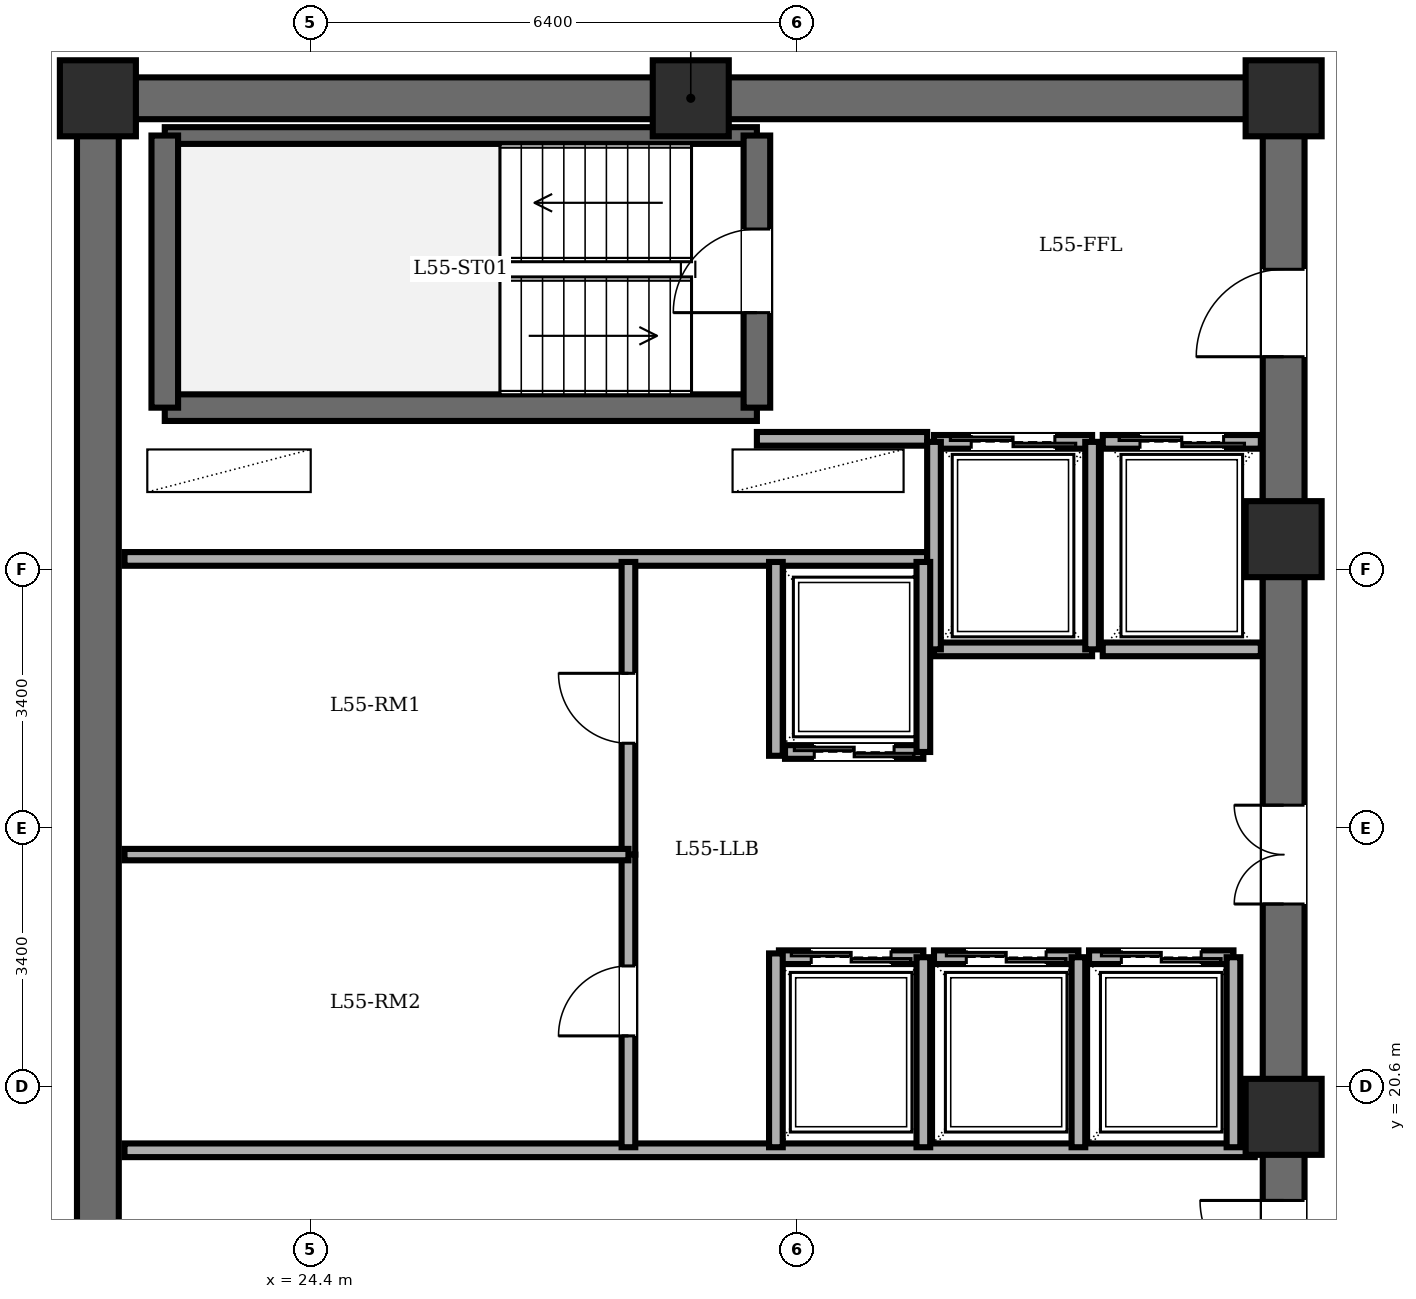
"""IFC4 building model, lengths in metres.
Left out: names, types, materials, properties, quantities, classifications, styles, units other than length and angle.
Written with IfcOpenShell. Run it as: python <this file> out.ifc"""

import sys

from ifc_helpers import new_model, si_unit, direction, frame, frame_2d, origin, origin_2d, place, context, subcontext, project, spatial, rectangle, extrude, element, fill, save


model = new_model("IFC4")
c1 = context("Model", 3, precision=1e-05, world=origin(), true_north=direction((0.0, 1.0)))
c2 = subcontext(c1, "Body", "Model", "MODEL_VIEW")
j1 = project(units=[si_unit("LENGTHUNIT", "METRE"), si_unit("PLANEANGLEUNIT", "RADIAN")], contexts=[c1])
p1 = place(None, origin())
s1 = spatial("IfcSite", under=j1, at=p1, CompositionType="ELEMENT")
p2 = place(p1, origin())
s2 = spatial("IfcBuilding", under=s1, at=p2, CompositionType="ELEMENT")
p3 = place(p2, frame((0.0, 0.0, 212.1)))
s3 = spatial("IfcBuildingStorey", under=s2, at=p3, CompositionType="ELEMENT", Elevation=212.1)
for number, where, z_axis, x_axis in (
    (1, (37.2, 20.2, 0.0), (0.0, 0.0, 1.0), (1.0, 0.0, 0.0)),
    (2, (37.2, 27.8, 0.0), (0.0, 0.0, 1.0), (1.0, 0.0, 0.0)),
    (3, (37.2, 33.6, 0.0), (0.0, 0.0, 1.0), (1.0, 0.0, 0.0)),
    (4, (29.4, 33.6, 0.0), (0.0, 0.0, 1.0), (1.0, 0.0, 0.0)),
    (5, (21.6, 33.6, 0.0), (0.0, 0.0, 1.0), (1.0, 0.0, 0.0)),
):
    element("IfcColumn", number, at=place(p3, frame(where, z_axis=z_axis, x_axis=x_axis)), inside=s3, PredefinedType="COLUMN", context=c2, shape_type="SweptSolid", body=[
        extrude(rectangle(XDim=1.0, YDim=1.0, at=origin_2d()), origin(), (0.0, 0.0, 1.0), 3.6),
    ])
p4 = place(p3, frame((21.6, 14.4, 0.0), z_axis=(0.0, 0.0, 1.0), x_axis=(0.0, 1.0, 0.0)))
e6 = element("IfcWall", 6, at=p4, inside=s3, PredefinedType="SHEAR", context=c2, shape_type="SweptSolid", body=[
    extrude(rectangle(XDim=19.2, YDim=0.55, at=frame_2d((9.6, 0.0))), origin(), (0.0, 0.0, 1.0), 3.4),
])
p5 = place(p3, frame((21.6, 33.6, 0.0), z_axis=(0.0, 0.0, 1.0), x_axis=(1.0, 0.0, 0.0)))
e7 = element("IfcWall", 7, at=p5, inside=s3, PredefinedType="SHEAR", context=c2, shape_type="SweptSolid", body=[
    extrude(rectangle(XDim=15.6, YDim=0.55, at=frame_2d((7.8, 0.0))), origin(), (0.0, 0.0, 1.0), 3.4),
])
p6 = place(p3, frame((37.2, 14.4, 0.0), z_axis=(0.0, 0.0, 1.0), x_axis=(0.0, 1.0, 0.0)))
e8 = element("IfcWall", 8, at=p6, inside=s3, PredefinedType="SHEAR", context=c2, shape_type="SweptSolid", body=[
    extrude(rectangle(XDim=19.2, YDim=0.55, at=frame_2d((9.6, 0.0))), origin(), (0.0, 0.0, 1.0), 3.4),
])
p7 = place(p6, frame((15.8, 0.0, 0.0)))
e9 = element("IfcOpeningElement", 9, at=p7, cuts=e8, PredefinedType="OPENING", context=c2, shape_type="SweptSolid", body=[
    extrude(rectangle(XDim=1.15, YDim=2.15, at=frame_2d((0.575, 1.075))), frame((0.0, 0.285, 0.0), z_axis=(0.0, -1.0, 0.0), x_axis=(1.0, 0.0, 0.0)), (0.0, 0.0, 1.0), 0.57),
])
p8 = place(p6, frame((3.6, 0.0, 0.0)))
e10 = element("IfcOpeningElement", 10, at=p8, cuts=e8, PredefinedType="OPENING", context=c2, shape_type="SweptSolid", body=[
    extrude(rectangle(XDim=1.1, YDim=2.15, at=frame_2d((0.55, 1.075))), frame((0.0, 0.285, 0.0), z_axis=(0.0, -1.0, 0.0), x_axis=(1.0, 0.0, 0.0)), (0.0, 0.0, 1.0), 0.57),
])
p9 = place(p6, frame((8.6, 0.0, 0.0)))
e11 = element("IfcOpeningElement", 11, at=p9, cuts=e8, PredefinedType="OPENING", context=c2, shape_type="SweptSolid", body=[
    extrude(rectangle(XDim=1.3, YDim=2.2, at=frame_2d((0.65, 1.1))), frame((0.0, 0.285, 0.0), z_axis=(0.0, -1.0, 0.0), x_axis=(1.0, 0.0, 0.0)), (0.0, 0.0, 1.0), 0.57),
])
p10 = place(p3, frame((22.48, 29.53, 0.0), z_axis=(0.0, 0.0, 1.0), x_axis=(1.0, 0.0, 0.0)))
e12 = element("IfcWall", 12, at=p10, inside=s3, PredefinedType="SOLIDWALL", context=c2, shape_type="SweptSolid", body=[
    extrude(rectangle(XDim=7.79, YDim=0.35, at=frame_2d((3.895, 0.0))), origin(), (0.0, 0.0, 1.0), 3.4),
])
p11 = place(p3, frame((22.48, 33.11, 0.0), z_axis=(0.0, 0.0, 1.0), x_axis=(1.0, 0.0, 0.0)))
e13 = element("IfcWall", 13, at=p11, inside=s3, PredefinedType="PARTITIONING", context=c2, shape_type="SweptSolid", body=[
    extrude(rectangle(XDim=7.79, YDim=0.22, at=frame_2d((3.895, 0.0))), origin(), (0.0, 0.0, 1.0), 3.4),
])
p12 = place(p3, frame((22.48, 29.53, 0.0), z_axis=(0.0, 0.0, 1.0), x_axis=(0.0, 1.0, 0.0)))
e14 = element("IfcWall", 14, at=p12, inside=s3, PredefinedType="SOLIDWALL", context=c2, shape_type="SweptSolid", body=[
    extrude(rectangle(XDim=3.58, YDim=0.35, at=frame_2d((1.79, 0.0))), origin(), (0.0, 0.0, 1.0), 3.4),
])
p13 = place(p3, frame((30.27, 29.53, 0.0), z_axis=(0.0, 0.0, 1.0), x_axis=(0.0, 1.0, 0.0)))
e15 = element("IfcWall", 15, at=p13, inside=s3, PredefinedType="SOLIDWALL", context=c2, shape_type="SweptSolid", body=[
    extrude(rectangle(XDim=3.58, YDim=0.35, at=frame_2d((1.79, 0.0))), origin(), (0.0, 0.0, 1.0), 3.4),
])
p14 = place(p13, frame((1.25, 0.0, 0.0)))
e16 = element("IfcOpeningElement", 16, at=p14, cuts=e15, PredefinedType="OPENING", context=c2, shape_type="SweptSolid", body=[
    extrude(rectangle(XDim=1.1, YDim=2.15, at=frame_2d((0.55, 1.075))), frame((0.0, 0.185, 0.0), z_axis=(0.0, -1.0, 0.0), x_axis=(1.0, 0.0, 0.0)), (0.0, 0.0, 1.0), 0.37),
])
p15 = place(p3, frame((30.27, 29.12, 0.0), z_axis=(0.0, 0.0, 1.0), x_axis=(1.0, 0.0, 0.0)))
e17 = element("IfcWall", 17, at=p15, inside=s3, PredefinedType="PARTITIONING", context=c2, shape_type="SweptSolid", body=[
    extrude(rectangle(XDim=2.24, YDim=0.18, at=frame_2d((1.12, 0.0))), origin(), (0.0, 0.0, 1.0), 3.4),
])
p16 = place(p3, frame((21.95, 27.54, 0.0), z_axis=(0.0, 0.0, 1.0), x_axis=(1.0, 0.0, 0.0)))
e18 = element("IfcWall", 18, at=p16, inside=s3, PredefinedType="PARTITIONING", context=c2, shape_type="SweptSolid", body=[
    extrude(rectangle(XDim=10.56, YDim=0.18, at=frame_2d((5.28, 0.0))), origin(), (0.0, 0.0, 1.0), 3.4),
])
p17 = place(p3, frame((21.95, 19.76, 0.0), z_axis=(0.0, 0.0, 1.0), x_axis=(1.0, 0.0, 0.0)))
e19 = element("IfcWall", 19, at=p17, inside=s3, PredefinedType="PARTITIONING", context=c2, shape_type="SweptSolid", body=[
    extrude(rectangle(XDim=14.87, YDim=0.18, at=frame_2d((7.435, 0.0))), origin(), (0.0, 0.0, 1.0), 3.4),
])
p18 = place(p3, frame((32.6, 29.08, 0.0), z_axis=(0.0, 0.0, 1.0), x_axis=(1.0, 0.0, 0.0)))
e20 = element("IfcWall", 20, at=p18, inside=s3, PredefinedType="PARTITIONING", context=c2, shape_type="SweptSolid", body=[
    extrude(rectangle(XDim=2.08, YDim=0.18, at=frame_2d((1.04, 0.0))), origin(), (0.0, 0.0, 1.0), 3.4),
])
p19 = place(p18, frame((0.49, 0.0, 0.0)))
e21 = element("IfcOpeningElement", 21, at=p19, cuts=e20, PredefinedType="OPENING", context=c2, shape_type="SweptSolid", body=[
    extrude(rectangle(XDim=1.1, YDim=2.2, at=frame_2d((0.55, 1.1))), frame((0.0, 0.1, 0.0), z_axis=(0.0, -1.0, 0.0), x_axis=(1.0, 0.0, 0.0)), (0.0, 0.0, 1.0), 0.2),
])
p20 = place(p3, frame((34.68, 26.35, 0.0), z_axis=(0.0, 0.0, 1.0), x_axis=(-1.0, 0.0, 0.0)))
e22 = element("IfcWall", 22, at=p20, inside=s3, PredefinedType="PARTITIONING", context=c2, shape_type="SweptSolid", body=[
    extrude(rectangle(XDim=2.08, YDim=0.18, at=frame_2d((1.04, 0.0))), origin(), (0.0, 0.0, 1.0), 3.4),
])
for number, where, z_axis, x_axis in (
    (23, (34.68, 26.35, 0.0), (0.0, 0.0, 1.0), (0.0, 1.0, 0.0)),
    (24, (32.6, 29.08, 0.0), (0.0, 0.0, 1.0), (0.0, -1.0, 0.0)),
):
    element("IfcWall", number, at=place(p3, frame(where, z_axis=z_axis, x_axis=x_axis)), inside=s3, PredefinedType="PARTITIONING", context=c2, shape_type="SweptSolid", body=[
        extrude(rectangle(XDim=2.73, YDim=0.18, at=frame_2d((1.365, 0.0))), origin(), (0.0, 0.0, 1.0), 3.4),
    ])
p21 = place(p3, frame((34.82, 29.08, 0.0), z_axis=(0.0, 0.0, 1.0), x_axis=(1.0, 0.0, 0.0)))
e25 = element("IfcWall", 25, at=p21, inside=s3, PredefinedType="PARTITIONING", context=c2, shape_type="SweptSolid", body=[
    extrude(rectangle(XDim=2.08, YDim=0.18, at=frame_2d((1.04, 0.0))), origin(), (0.0, 0.0, 1.0), 3.4),
])
p22 = place(p21, frame((0.49, 0.0, 0.0)))
e26 = element("IfcOpeningElement", 26, at=p22, cuts=e25, PredefinedType="OPENING", context=c2, shape_type="SweptSolid", body=[
    extrude(rectangle(XDim=1.1, YDim=2.2, at=frame_2d((0.55, 1.1))), frame((0.0, 0.1, 0.0), z_axis=(0.0, -1.0, 0.0), x_axis=(1.0, 0.0, 0.0)), (0.0, 0.0, 1.0), 0.2),
])
p23 = place(p3, frame((36.9, 26.35, 0.0), z_axis=(0.0, 0.0, 1.0), x_axis=(-1.0, 0.0, 0.0)))
e27 = element("IfcWall", 27, at=p23, inside=s3, PredefinedType="PARTITIONING", context=c2, shape_type="SweptSolid", body=[
    extrude(rectangle(XDim=2.08, YDim=0.18, at=frame_2d((1.04, 0.0))), origin(), (0.0, 0.0, 1.0), 3.4),
])
p24 = place(p3, frame((32.46, 25.0, 0.0), z_axis=(0.0, 0.0, 1.0), x_axis=(-1.0, 0.0, 0.0)))
e28 = element("IfcWall", 28, at=p24, inside=s3, PredefinedType="PARTITIONING", context=c2, shape_type="SweptSolid", body=[
    extrude(rectangle(XDim=1.82, YDim=0.18, at=frame_2d((0.91, 0.0))), origin(), (0.0, 0.0, 1.0), 3.4),
])
p25 = place(p24, frame((0.385, 0.0, 0.0)))
e29 = element("IfcOpeningElement", 29, at=p25, cuts=e28, PredefinedType="OPENING", context=c2, shape_type="SweptSolid", body=[
    extrude(rectangle(XDim=1.05, YDim=2.2, at=frame_2d((0.525, 1.1))), frame((0.0, 0.1, 0.0), z_axis=(0.0, -1.0, 0.0), x_axis=(1.0, 0.0, 0.0)), (0.0, 0.0, 1.0), 0.2),
])
p26 = place(p3, frame((32.46, 25.0, 0.0), z_axis=(0.0, 0.0, 1.0), x_axis=(0.0, 1.0, 0.0)))
e30 = element("IfcWall", 30, at=p26, inside=s3, PredefinedType="PARTITIONING", context=c2, shape_type="SweptSolid", body=[
    extrude(rectangle(XDim=2.5, YDim=0.18, at=frame_2d((1.25, 0.0))), origin(), (0.0, 0.0, 1.0), 3.4),
])
p27 = place(p3, frame((30.56, 22.3, 0.0), z_axis=(0.0, 0.0, 1.0), x_axis=(1.0, 0.0, 0.0)))
e31 = element("IfcWall", 31, at=p27, inside=s3, PredefinedType="PARTITIONING", context=c2, shape_type="SweptSolid", body=[
    extrude(rectangle(XDim=1.9, YDim=0.18, at=frame_2d((0.95, 0.0))), origin(), (0.0, 0.0, 1.0), 3.4),
])
p28 = place(p27, frame((0.425, 0.0, 0.0)))
e32 = element("IfcOpeningElement", 32, at=p28, cuts=e31, PredefinedType="OPENING", context=c2, shape_type="SweptSolid", body=[
    extrude(rectangle(XDim=1.05, YDim=2.2, at=frame_2d((0.525, 1.1))), frame((0.0, 0.1, 0.0), z_axis=(0.0, -1.0, 0.0), x_axis=(1.0, 0.0, 0.0)), (0.0, 0.0, 1.0), 0.2),
])
p29 = place(p3, frame((32.46, 19.8, 0.0), z_axis=(0.0, 0.0, 1.0), x_axis=(0.0, 1.0, 0.0)))
e33 = element("IfcWall", 33, at=p29, inside=s3, PredefinedType="PARTITIONING", context=c2, shape_type="SweptSolid", body=[
    extrude(rectangle(XDim=2.5, YDim=0.18, at=frame_2d((1.25, 0.0))), origin(), (0.0, 0.0, 1.0), 3.4),
])
p30 = place(p3, frame((32.6, 22.3, 0.0), z_axis=(0.0, 0.0, 1.0), x_axis=(1.0, 0.0, 0.0)))
e34 = element("IfcWall", 34, at=p30, inside=s3, PredefinedType="PARTITIONING", context=c2, shape_type="SweptSolid", body=[
    extrude(rectangle(XDim=1.9, YDim=0.18, at=frame_2d((0.95, 0.0))), origin(), (0.0, 0.0, 1.0), 3.4),
])
p31 = place(p30, frame((0.425, 0.0, 0.0)))
e35 = element("IfcOpeningElement", 35, at=p31, cuts=e34, PredefinedType="OPENING", context=c2, shape_type="SweptSolid", body=[
    extrude(rectangle(XDim=1.05, YDim=2.2, at=frame_2d((0.525, 1.1))), frame((0.0, 0.1, 0.0), z_axis=(0.0, -1.0, 0.0), x_axis=(1.0, 0.0, 0.0)), (0.0, 0.0, 1.0), 0.2),
])
p32 = place(p3, frame((34.5, 19.8, 0.0), z_axis=(0.0, 0.0, 1.0), x_axis=(0.0, 1.0, 0.0)))
e36 = element("IfcWall", 36, at=p32, inside=s3, PredefinedType="PARTITIONING", context=c2, shape_type="SweptSolid", body=[
    extrude(rectangle(XDim=2.5, YDim=0.18, at=frame_2d((1.25, 0.0))), origin(), (0.0, 0.0, 1.0), 3.4),
])
p33 = place(p3, frame((34.64, 22.3, 0.0), z_axis=(0.0, 0.0, 1.0), x_axis=(1.0, 0.0, 0.0)))
e37 = element("IfcWall", 37, at=p33, inside=s3, PredefinedType="PARTITIONING", context=c2, shape_type="SweptSolid", body=[
    extrude(rectangle(XDim=1.9, YDim=0.18, at=frame_2d((0.95, 0.0))), origin(), (0.0, 0.0, 1.0), 3.4),
])
p34 = place(p33, frame((0.425, 0.0, 0.0)))
e38 = element("IfcOpeningElement", 38, at=p34, cuts=e37, PredefinedType="OPENING", context=c2, shape_type="SweptSolid", body=[
    extrude(rectangle(XDim=1.05, YDim=2.2, at=frame_2d((0.525, 1.1))), frame((0.0, 0.1, 0.0), z_axis=(0.0, -1.0, 0.0), x_axis=(1.0, 0.0, 0.0)), (0.0, 0.0, 1.0), 0.2),
])
p35 = place(p3, frame((36.54, 19.8, 0.0), z_axis=(0.0, 0.0, 1.0), x_axis=(0.0, 1.0, 0.0)))
e39 = element("IfcWall", 39, at=p35, inside=s3, PredefinedType="PARTITIONING", context=c2, shape_type="SweptSolid", body=[
    extrude(rectangle(XDim=2.5, YDim=0.18, at=frame_2d((1.25, 0.0))), origin(), (0.0, 0.0, 1.0), 3.4),
])
for number, where, z_axis, x_axis in (
    (40, (30.52, 24.95, 0.0), (0.0, 0.0, 1.0), (0.0, 1.0, 0.0)),
    (41, (30.52, 19.8, 0.0), (0.0, 0.0, 1.0), (0.0, 1.0, 0.0)),
):
    element("IfcWall", number, at=place(p3, frame(where, z_axis=z_axis, x_axis=x_axis)), inside=s3, PredefinedType="PARTITIONING", context=c2, shape_type="SweptSolid", body=[
        extrude(rectangle(XDim=2.55, YDim=0.18, at=frame_2d((1.275, 0.0))), origin(), (0.0, 0.0, 1.0), 3.4),
    ])
p36 = place(p3, frame((28.58, 23.65, 0.0), z_axis=(0.0, 0.0, 1.0), x_axis=(0.0, 1.0, 0.0)))
e42 = element("IfcWall", 42, at=p36, inside=s3, PredefinedType="PARTITIONING", context=c2, shape_type="SweptSolid", body=[
    extrude(rectangle(XDim=3.85, YDim=0.18, at=frame_2d((1.925, 0.0))), origin(), (0.0, 0.0, 1.0), 3.4),
])
p37 = place(p36, frame((1.465, 0.0, 0.0)))
e43 = element("IfcOpeningElement", 43, at=p37, cuts=e42, PredefinedType="OPENING", context=c2, shape_type="SweptSolid", body=[
    extrude(rectangle(XDim=0.92, YDim=2.1, at=frame_2d((0.46, 1.05))), frame((0.0, 0.1, 0.0), z_axis=(0.0, -1.0, 0.0), x_axis=(1.0, 0.0, 0.0)), (0.0, 0.0, 1.0), 0.2),
])
p38 = place(p3, frame((28.58, 19.8, 0.0), z_axis=(0.0, 0.0, 1.0), x_axis=(0.0, 1.0, 0.0)))
e44 = element("IfcWall", 44, at=p38, inside=s3, PredefinedType="PARTITIONING", context=c2, shape_type="SweptSolid", body=[
    extrude(rectangle(XDim=3.85, YDim=0.18, at=frame_2d((1.925, 0.0))), origin(), (0.0, 0.0, 1.0), 3.4),
])
p39 = place(p38, frame((1.465, 0.0, 0.0)))
e45 = element("IfcOpeningElement", 45, at=p39, cuts=e44, PredefinedType="OPENING", context=c2, shape_type="SweptSolid", body=[
    extrude(rectangle(XDim=0.92, YDim=2.1, at=frame_2d((0.46, 1.05))), frame((0.0, 0.1, 0.0), z_axis=(0.0, -1.0, 0.0), x_axis=(1.0, 0.0, 0.0)), (0.0, 0.0, 1.0), 0.2),
])
p40 = place(p3, frame((21.95, 23.65, 0.0), z_axis=(0.0, 0.0, 1.0), x_axis=(1.0, 0.0, 0.0)))
e46 = element("IfcWall", 46, at=p40, inside=s3, PredefinedType="PARTITIONING", context=c2, shape_type="SweptSolid", body=[
    extrude(rectangle(XDim=6.63, YDim=0.15, at=frame_2d((3.315, 0.0))), origin(), (0.0, 0.0, 1.0), 3.4),
])
p41 = place(p14, origin())
e47 = element("IfcDoor", 47, at=p41, inside=s3, OperationType="SINGLE_SWING_LEFT", PredefinedType="DOOR", context=c2, shape_type="SweptSolid", body=[
    extrude(rectangle(XDim=1.1, YDim=2.15, at=frame_2d((0.55, 1.075))), frame((0.0, 0.025, 0.0), z_axis=(0.0, -1.0, 0.0), x_axis=(1.0, 0.0, 0.0)), (0.0, 0.0, 1.0), 0.05),
])
fill(e16, e47)
p42 = place(p7, origin())
e48 = element("IfcDoor", 48, at=p42, inside=s3, OperationType="SINGLE_SWING_LEFT", PredefinedType="DOOR", context=c2, shape_type="SweptSolid", body=[
    extrude(rectangle(XDim=1.15, YDim=2.15, at=frame_2d((0.575, 1.075))), frame((0.0, 0.025, 0.0), z_axis=(0.0, -1.0, 0.0), x_axis=(1.0, 0.0, 0.0)), (0.0, 0.0, 1.0), 0.05),
])
fill(e9, e48)
p43 = place(p8, origin())
e49 = element("IfcDoor", 49, at=p43, inside=s3, OperationType="SINGLE_SWING_RIGHT", PredefinedType="DOOR", context=c2, shape_type="SweptSolid", body=[
    extrude(rectangle(XDim=1.1, YDim=2.15, at=frame_2d((0.55, 1.075))), frame((0.0, 0.025, 0.0), z_axis=(0.0, -1.0, 0.0), x_axis=(1.0, 0.0, 0.0)), (0.0, 0.0, 1.0), 0.05),
])
fill(e10, e49)
p44 = place(p19, origin())
e50 = element("IfcDoor", 50, at=p44, inside=s3, OperationType="DOUBLE_DOOR_SLIDING", PredefinedType="DOOR", context=c2, shape_type="SweptSolid", body=[
    extrude(rectangle(XDim=1.1, YDim=2.2, at=frame_2d((0.55, 1.1))), frame((0.0, 0.025, 0.0), z_axis=(0.0, -1.0, 0.0), x_axis=(1.0, 0.0, 0.0)), (0.0, 0.0, 1.0), 0.05),
])
fill(e21, e50)
p45 = place(p22, origin())
e51 = element("IfcDoor", 51, at=p45, inside=s3, OperationType="DOUBLE_DOOR_SLIDING", PredefinedType="DOOR", context=c2, shape_type="SweptSolid", body=[
    extrude(rectangle(XDim=1.1, YDim=2.2, at=frame_2d((0.55, 1.1))), frame((0.0, 0.025, 0.0), z_axis=(0.0, -1.0, 0.0), x_axis=(1.0, 0.0, 0.0)), (0.0, 0.0, 1.0), 0.05),
])
fill(e26, e51)
p46 = place(p25, origin())
e52 = element("IfcDoor", 52, at=p46, inside=s3, OperationType="DOUBLE_DOOR_SLIDING", PredefinedType="DOOR", context=c2, shape_type="SweptSolid", body=[
    extrude(rectangle(XDim=1.05, YDim=2.2, at=frame_2d((0.525, 1.1))), frame((0.0, 0.025, 0.0), z_axis=(0.0, -1.0, 0.0), x_axis=(1.0, 0.0, 0.0)), (0.0, 0.0, 1.0), 0.05),
])
fill(e29, e52)
p47 = place(p28, origin())
e53 = element("IfcDoor", 53, at=p47, inside=s3, OperationType="DOUBLE_DOOR_SLIDING", PredefinedType="DOOR", context=c2, shape_type="SweptSolid", body=[
    extrude(rectangle(XDim=1.05, YDim=2.2, at=frame_2d((0.525, 1.1))), frame((0.0, 0.025, 0.0), z_axis=(0.0, -1.0, 0.0), x_axis=(1.0, 0.0, 0.0)), (0.0, 0.0, 1.0), 0.05),
])
fill(e32, e53)
p48 = place(p31, origin())
e54 = element("IfcDoor", 54, at=p48, inside=s3, OperationType="DOUBLE_DOOR_SLIDING", PredefinedType="DOOR", context=c2, shape_type="SweptSolid", body=[
    extrude(rectangle(XDim=1.05, YDim=2.2, at=frame_2d((0.525, 1.1))), frame((0.0, 0.025, 0.0), z_axis=(0.0, -1.0, 0.0), x_axis=(1.0, 0.0, 0.0)), (0.0, 0.0, 1.0), 0.05),
])
fill(e35, e54)
p49 = place(p34, origin())
e55 = element("IfcDoor", 55, at=p49, inside=s3, OperationType="DOUBLE_DOOR_SLIDING", PredefinedType="DOOR", context=c2, shape_type="SweptSolid", body=[
    extrude(rectangle(XDim=1.05, YDim=2.2, at=frame_2d((0.525, 1.1))), frame((0.0, 0.025, 0.0), z_axis=(0.0, -1.0, 0.0), x_axis=(1.0, 0.0, 0.0)), (0.0, 0.0, 1.0), 0.05),
])
fill(e38, e55)
p50 = place(p37, origin())
e56 = element("IfcDoor", 56, at=p50, inside=s3, OperationType="SINGLE_SWING_RIGHT", PredefinedType="DOOR", context=c2, shape_type="SweptSolid", body=[
    extrude(rectangle(XDim=0.92, YDim=2.1, at=frame_2d((0.46, 1.05))), frame((0.0, 0.025, 0.0), z_axis=(0.0, -1.0, 0.0), x_axis=(1.0, 0.0, 0.0)), (0.0, 0.0, 1.0), 0.05),
])
fill(e43, e56)
p51 = place(p39, origin())
e57 = element("IfcDoor", 57, at=p51, inside=s3, OperationType="SINGLE_SWING_LEFT", PredefinedType="DOOR", context=c2, shape_type="SweptSolid", body=[
    extrude(rectangle(XDim=0.92, YDim=2.1, at=frame_2d((0.46, 1.05))), frame((0.0, 0.025, 0.0), z_axis=(0.0, -1.0, 0.0), x_axis=(1.0, 0.0, 0.0)), (0.0, 0.0, 1.0), 0.05),
])
fill(e45, e57)
p52 = place(p9, origin())
e58 = element("IfcDoor", 58, at=p52, inside=s3, OperationType="DOUBLE_DOOR_SINGLE_SWING", PredefinedType="DOOR", context=c2, shape_type="SweptSolid", body=[
    extrude(rectangle(XDim=1.3, YDim=2.2, at=frame_2d((0.65, 1.1))), frame((0.0, 0.025, 0.0), z_axis=(0.0, -1.0, 0.0), x_axis=(1.0, 0.0, 0.0)), (0.0, 0.0, 1.0), 0.05),
])
fill(e11, e58)
save(model, sys.argv[1])
